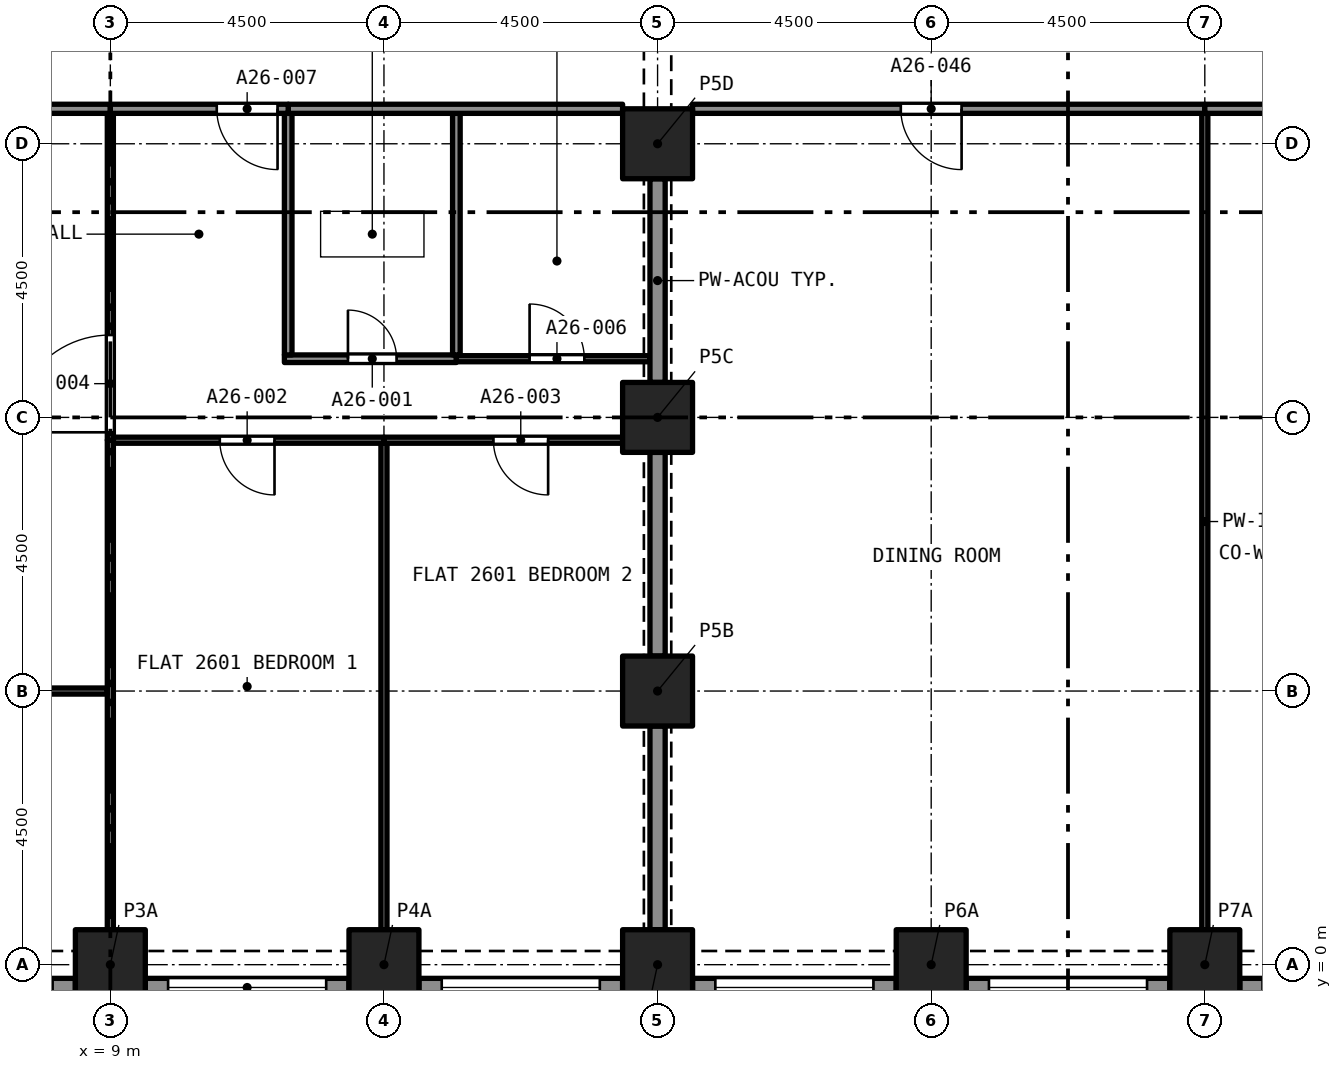
"""IFC4 building model, lengths in metres.
Left out: names, types, materials, properties, quantities, classifications, styles, units other than length and angle.
Written with IfcOpenShell. Run it as: python <this file> out.ifc"""

import sys

from ifc_helpers import new_model, si_unit, direction, frame, frame_2d, origin, origin_2d, place, context, subcontext, project, spatial, rectangle, extrude, element, fill, save


model = new_model("IFC4")
c1 = context("Model", 3, precision=1e-05, world=origin(), true_north=direction((0.0, 1.0)))
c2 = subcontext(c1, "Body", "Model", "MODEL_VIEW")
j1 = project(units=[si_unit("LENGTHUNIT", "METRE"), si_unit("PLANEANGLEUNIT", "RADIAN")], contexts=[c1])
p1 = place(None, origin())
s1 = spatial("IfcSite", under=j1, at=p1, CompositionType="ELEMENT")
p2 = place(p1, origin())
s2 = spatial("IfcBuilding", under=s1, at=p2, CompositionType="ELEMENT")
p3 = place(p2, frame((0.0, 0.0, 96.0)))
s3 = spatial("IfcBuildingStorey", under=s2, at=p3, CompositionType="ELEMENT", Elevation=96.0)
for number, where, z_axis, x_axis in (
    (1, (9.0, 0.0, 0.0), (0.0, 0.0, 1.0), (1.0, 0.0, 0.0)),
    (2, (13.5, 0.0, 0.0), (0.0, 0.0, 1.0), (1.0, 0.0, 0.0)),
    (3, (18.0, 0.0, 0.0), (0.0, 0.0, 1.0), (1.0, 0.0, 0.0)),
    (4, (22.5, 0.0, 0.0), (0.0, 0.0, 1.0), (1.0, 0.0, 0.0)),
    (5, (27.0, 0.0, 0.0), (0.0, 0.0, 1.0), (1.0, 0.0, 0.0)),
    (6, (18.0, 4.5, 0.0), (0.0, 0.0, 1.0), (1.0, 0.0, 0.0)),
    (7, (18.0, 9.0, 0.0), (0.0, 0.0, 1.0), (1.0, 0.0, 0.0)),
    (8, (18.0, 13.5, 0.0), (0.0, 0.0, 1.0), (1.0, 0.0, 0.0)),
):
    element("IfcColumn", number, at=place(p3, frame(where, z_axis=z_axis, x_axis=x_axis)), inside=s3, PredefinedType="COLUMN", context=c2, shape_type="SweptSolid", body=[
        extrude(rectangle(XDim=1.15, YDim=1.15, at=origin_2d()), origin(), (0.0, 0.0, 1.0), 3.2),
    ])
p4 = place(p3, frame((8.425, -0.375, 0.0), z_axis=(0.0, 0.0, 1.0), x_axis=(-1.0, 0.0, 0.0)))
e9 = element("IfcWall", 9, at=p4, inside=s3, PredefinedType="SOLIDWALL", context=c2, shape_type="SweptSolid", body=[
    extrude(rectangle(XDim=3.35, YDim=0.3, at=frame_2d((1.675, 0.0))), origin(), (0.0, 0.0, 1.0), 3.2),
])
p5 = place(p4, frame((0.375, 0.0, 0.45)))
e10 = element("IfcOpeningElement", 10, at=p5, cuts=e9, PredefinedType="OPENING", context=c2, shape_type="SweptSolid", body=[
    extrude(rectangle(XDim=2.6, YDim=1.95, at=frame_2d((1.3, 0.975))), frame((0.0, 0.16, 0.0), z_axis=(0.0, -1.0, 0.0), x_axis=(1.0, 0.0, 0.0)), (0.0, 0.0, 1.0), 0.32),
])
p6 = place(p3, frame((12.925, -0.375, 0.0), z_axis=(0.0, 0.0, 1.0), x_axis=(-1.0, 0.0, 0.0)))
e11 = element("IfcWall", 11, at=p6, inside=s3, PredefinedType="SOLIDWALL", context=c2, shape_type="SweptSolid", body=[
    extrude(rectangle(XDim=3.35, YDim=0.3, at=frame_2d((1.675, 0.0))), origin(), (0.0, 0.0, 1.0), 3.2),
])
p7 = place(p6, frame((0.375, 0.0, 0.45)))
e12 = element("IfcOpeningElement", 12, at=p7, cuts=e11, PredefinedType="OPENING", context=c2, shape_type="SweptSolid", body=[
    extrude(rectangle(XDim=2.6, YDim=1.95, at=frame_2d((1.3, 0.975))), frame((0.0, 0.16, 0.0), z_axis=(0.0, -1.0, 0.0), x_axis=(1.0, 0.0, 0.0)), (0.0, 0.0, 1.0), 0.32),
])
p8 = place(p3, frame((17.425, -0.375, 0.0), z_axis=(0.0, 0.0, 1.0), x_axis=(-1.0, 0.0, 0.0)))
e13 = element("IfcWall", 13, at=p8, inside=s3, PredefinedType="SOLIDWALL", context=c2, shape_type="SweptSolid", body=[
    extrude(rectangle(XDim=3.35, YDim=0.3, at=frame_2d((1.675, 0.0))), origin(), (0.0, 0.0, 1.0), 3.2),
])
p9 = place(p8, frame((0.375, 0.0, 0.45)))
e14 = element("IfcOpeningElement", 14, at=p9, cuts=e13, PredefinedType="OPENING", context=c2, shape_type="SweptSolid", body=[
    extrude(rectangle(XDim=2.6, YDim=1.95, at=frame_2d((1.3, 0.975))), frame((0.0, 0.16, 0.0), z_axis=(0.0, -1.0, 0.0), x_axis=(1.0, 0.0, 0.0)), (0.0, 0.0, 1.0), 0.32),
])
p10 = place(p3, frame((21.925, -0.375, 0.0), z_axis=(0.0, 0.0, 1.0), x_axis=(-1.0, 0.0, 0.0)))
e15 = element("IfcWall", 15, at=p10, inside=s3, PredefinedType="SOLIDWALL", context=c2, shape_type="SweptSolid", body=[
    extrude(rectangle(XDim=3.35, YDim=0.3, at=frame_2d((1.675, 0.0))), origin(), (0.0, 0.0, 1.0), 3.2),
])
p11 = place(p10, frame((0.375, 0.0, 0.45)))
e16 = element("IfcOpeningElement", 16, at=p11, cuts=e15, PredefinedType="OPENING", context=c2, shape_type="SweptSolid", body=[
    extrude(rectangle(XDim=2.6, YDim=1.95, at=frame_2d((1.3, 0.975))), frame((0.0, 0.16, 0.0), z_axis=(0.0, -1.0, 0.0), x_axis=(1.0, 0.0, 0.0)), (0.0, 0.0, 1.0), 0.32),
])
p12 = place(p3, frame((26.425, -0.375, 0.0), z_axis=(0.0, 0.0, 1.0), x_axis=(-1.0, 0.0, 0.0)))
e17 = element("IfcWall", 17, at=p12, inside=s3, PredefinedType="SOLIDWALL", context=c2, shape_type="SweptSolid", body=[
    extrude(rectangle(XDim=3.35, YDim=0.3, at=frame_2d((1.675, 0.0))), origin(), (0.0, 0.0, 1.0), 3.2),
])
p13 = place(p12, frame((0.375, 0.0, 0.45)))
e18 = element("IfcOpeningElement", 18, at=p13, cuts=e17, PredefinedType="OPENING", context=c2, shape_type="SweptSolid", body=[
    extrude(rectangle(XDim=2.6, YDim=1.95, at=frame_2d((1.3, 0.975))), frame((0.0, 0.16, 0.0), z_axis=(0.0, -1.0, 0.0), x_axis=(1.0, 0.0, 0.0)), (0.0, 0.0, 1.0), 0.32),
])
p14 = place(p3, frame((30.925, -0.375, 0.0), z_axis=(0.0, 0.0, 1.0), x_axis=(-1.0, 0.0, 0.0)))
e19 = element("IfcWall", 19, at=p14, inside=s3, PredefinedType="SOLIDWALL", context=c2, shape_type="SweptSolid", body=[
    extrude(rectangle(XDim=3.35, YDim=0.3, at=frame_2d((1.675, 0.0))), origin(), (0.0, 0.0, 1.0), 3.2),
])
p15 = place(p14, frame((0.375, 0.0, 0.45)))
e20 = element("IfcOpeningElement", 20, at=p15, cuts=e19, PredefinedType="OPENING", context=c2, shape_type="SweptSolid", body=[
    extrude(rectangle(XDim=2.6, YDim=1.95, at=frame_2d((1.3, 0.975))), frame((0.0, 0.16, 0.0), z_axis=(0.0, -1.0, 0.0), x_axis=(1.0, 0.0, 0.0)), (0.0, 0.0, 1.0), 0.32),
])
p16 = place(p3, frame((11.863, 9.965, 0.0), z_axis=(0.0, 0.0, 1.0), x_axis=(1.0, 0.0, 0.0)))
e21 = element("IfcWall", 21, at=p16, inside=s3, PredefinedType="PARTITIONING", context=c2, shape_type="SweptSolid", body=[
    extrude(rectangle(XDim=2.828, YDim=0.125, at=frame_2d((1.414, 0.0))), origin(), (0.0, 0.0, 1.0), 2.9),
])
p17 = place(p16, frame((1.045, 0.0, 0.0)))
e22 = element("IfcOpeningElement", 22, at=p17, cuts=e21, PredefinedType="OPENING", context=c2, shape_type="SweptSolid", body=[
    extrude(rectangle(XDim=0.8, YDim=2.1, at=frame_2d((0.4, 1.05))), frame((0.0, 0.073, 0.0), z_axis=(0.0, -1.0, 0.0), x_axis=(1.0, 0.0, 0.0)), (0.0, 0.0, 1.0), 0.145),
])
for number, where, z_axis, x_axis in (
    (23, (11.925, 10.028, 0.0), (0.0, 0.0, 1.0), (0.0, 1.0, 0.0)),
    (24, (14.691, 10.028, 0.0), (0.0, 0.0, 1.0), (0.0, 1.0, 0.0)),
):
    element("IfcWall", number, at=place(p3, frame(where, z_axis=z_axis, x_axis=x_axis)), inside=s3, PredefinedType="PARTITIONING", context=c2, shape_type="SweptSolid", body=[
        extrude(rectangle(XDim=3.972, YDim=0.125, at=frame_2d((1.986, 0.0))), origin(), (0.0, 0.0, 1.0), 2.9),
    ])
p18 = place(p3, frame((11.925, 14.075, 0.0), z_axis=(0.0, 0.0, 1.0), x_axis=(1.0, 0.0, 0.0)))
e25 = element("IfcWall", 25, at=p18, inside=s3, PredefinedType="PARTITIONING", context=c2, shape_type="SweptSolid", body=[
    extrude(rectangle(XDim=5.5, YDim=0.15, at=frame_2d((2.75, 0.0))), origin(), (0.0, 0.0, 1.0), 2.9),
])
p19 = place(p3, frame((13.5, 0.575, 0.0), z_axis=(0.0, 0.0, 1.0), x_axis=(0.0, 1.0, 0.0)))
e26 = element("IfcWall", 26, at=p19, inside=s3, PredefinedType="PARTITIONING", context=c2, shape_type="SweptSolid", body=[
    extrude(rectangle(XDim=8.0, YDim=0.1, at=frame_2d((4.0, 0.0))), origin(), (0.0, 0.0, 1.0), 2.9),
])
p20 = place(p3, frame((13.5, 8.625, 0.0), z_axis=(0.0, 0.0, 1.0), x_axis=(-1.0, 0.0, 0.0)))
e27 = element("IfcWall", 27, at=p20, inside=s3, PredefinedType="PARTITIONING", context=c2, shape_type="SweptSolid", body=[
    extrude(rectangle(XDim=4.45, YDim=0.1, at=frame_2d((2.225, 0.0))), origin(), (0.0, 0.0, 1.0), 2.9),
])
p21 = place(p20, frame((1.8, 0.0, 0.0)))
e28 = element("IfcOpeningElement", 28, at=p21, cuts=e27, PredefinedType="OPENING", context=c2, shape_type="SweptSolid", body=[
    extrude(rectangle(XDim=0.9, YDim=2.1, at=frame_2d((0.45, 1.05))), frame((0.0, 0.06, 0.0), z_axis=(0.0, -1.0, 0.0), x_axis=(1.0, 0.0, 0.0)), (0.0, 0.0, 1.0), 0.12),
])
p22 = place(p3, frame((9.0, 0.575, 0.0), z_axis=(0.0, 0.0, 1.0), x_axis=(0.0, 1.0, 0.0)))
e29 = element("IfcWall", 29, at=p22, inside=s3, PredefinedType="PARTITIONING", context=c2, shape_type="SweptSolid", body=[
    extrude(rectangle(XDim=8.05, YDim=0.1, at=frame_2d((4.025, 0.0))), origin(), (0.0, 0.0, 1.0), 2.9),
])
p23 = place(p3, frame((17.425, 8.625, 0.0), z_axis=(0.0, 0.0, 1.0), x_axis=(-1.0, 0.0, 0.0)))
e30 = element("IfcWall", 30, at=p23, inside=s3, PredefinedType="PARTITIONING", context=c2, shape_type="SweptSolid", body=[
    extrude(rectangle(XDim=3.925, YDim=0.1, at=frame_2d((1.962, 0.0))), origin(), (0.0, 0.0, 1.0), 2.9),
])
p24 = place(p23, frame((1.225, 0.0, 0.0)))
e31 = element("IfcOpeningElement", 31, at=p24, cuts=e30, PredefinedType="OPENING", context=c2, shape_type="SweptSolid", body=[
    extrude(rectangle(XDim=0.9, YDim=2.1, at=frame_2d((0.45, 1.05))), frame((0.0, 0.06, 0.0), z_axis=(0.0, -1.0, 0.0), x_axis=(1.0, 0.0, 0.0)), (0.0, 0.0, 1.0), 0.12),
])
for number, where, z_axis, x_axis in (
    (32, (18.0, 5.075, 0.0), (0.0, 0.0, 1.0), (0.0, 1.0, 0.0)),
    (33, (18.0, 0.575, 0.0), (0.0, 0.0, 1.0), (0.0, 1.0, 0.0)),
):
    element("IfcWall", number, at=place(p3, frame(where, z_axis=z_axis, x_axis=x_axis)), inside=s3, PredefinedType="PARTITIONING", context=c2, shape_type="SweptSolid", body=[
        extrude(rectangle(XDim=3.35, YDim=0.25, at=frame_2d((1.675, 0.0))), origin(), (0.0, 0.0, 1.0), 2.38),
    ])
p25 = place(p3, frame((9.0, 8.625, 0.0), z_axis=(0.0, 0.0, 1.0), x_axis=(0.0, 1.0, 0.0)))
e34 = element("IfcWall", 34, at=p25, inside=s3, PredefinedType="PARTITIONING", context=c2, shape_type="SweptSolid", body=[
    extrude(rectangle(XDim=5.375, YDim=0.1, at=frame_2d((2.688, 0.0))), origin(), (0.0, 0.0, 1.0), 2.9),
])
p26 = place(p25, frame((0.13, 0.0, 0.0)))
e35 = element("IfcOpeningElement", 35, at=p26, cuts=e34, PredefinedType="OPENING", context=c2, shape_type="SweptSolid", body=[
    extrude(rectangle(XDim=1.6, YDim=2.1, at=frame_2d((0.8, 1.05))), frame((0.0, 0.06, 0.0), z_axis=(0.0, -1.0, 0.0), x_axis=(1.0, 0.0, 0.0)), (0.0, 0.0, 1.0), 0.12),
])
p27 = place(p3, frame((0.622, 4.5, 0.0), z_axis=(0.0, 0.0, 1.0), x_axis=(1.0, 0.0, 0.0)))
e36 = element("IfcWall", 36, at=p27, inside=s3, PredefinedType="PARTITIONING", context=c2, shape_type="SweptSolid", body=[
    extrude(rectangle(XDim=8.328, YDim=0.1, at=frame_2d((4.164, 0.0))), origin(), (0.0, 0.0, 1.0), 2.9),
])
p28 = place(p27, frame((3.365, 0.0, 0.0)))
e37 = element("IfcOpeningElement", 37, at=p28, cuts=e36, PredefinedType="OPENING", context=c2, shape_type="SweptSolid", body=[
    extrude(rectangle(XDim=1.6, YDim=2.1, at=frame_2d((0.8, 1.05))), frame((0.0, 0.06, 0.0), z_axis=(0.0, -1.0, 0.0), x_axis=(1.0, 0.0, 0.0)), (0.0, 0.0, 1.0), 0.12),
])
p29 = place(p3, frame((0.575, 14.075, 0.0), z_axis=(0.0, 0.0, 1.0), x_axis=(1.0, 0.0, 0.0)))
e38 = element("IfcWall", 38, at=p29, inside=s3, PredefinedType="PARTITIONING", context=c2, shape_type="SweptSolid", body=[
    extrude(rectangle(XDim=8.425, YDim=0.15, at=frame_2d((4.212, 0.0))), origin(), (0.0, 0.0, 1.0), 2.9),
])
p30 = place(p3, frame((14.69, 9.965, 0.0), z_axis=(0.0, 0.0, 1.0), x_axis=(1.0, 0.0, 0.0)))
e39 = element("IfcWall", 39, at=p30, inside=s3, PredefinedType="PARTITIONING", context=c2, shape_type="SweptSolid", body=[
    extrude(rectangle(XDim=3.185, YDim=0.1, at=frame_2d((1.592, 0.0))), origin(), (0.0, 0.0, 1.0), 2.9),
])
p31 = place(p30, frame((1.205, 0.0, 0.0)))
e40 = element("IfcOpeningElement", 40, at=p31, cuts=e39, PredefinedType="OPENING", context=c2, shape_type="SweptSolid", body=[
    extrude(rectangle(XDim=0.9, YDim=2.1, at=frame_2d((0.45, 1.05))), frame((0.0, 0.06, 0.0), z_axis=(0.0, -1.0, 0.0), x_axis=(1.0, 0.0, 0.0)), (0.0, 0.0, 1.0), 0.12),
])
p32 = place(p3, frame((18.0, 9.575, 0.0), z_axis=(0.0, 0.0, 1.0), x_axis=(0.0, 1.0, 0.0)))
e41 = element("IfcWall", 41, at=p32, inside=s3, PredefinedType="PARTITIONING", context=c2, shape_type="SweptSolid", body=[
    extrude(rectangle(XDim=3.35, YDim=0.25, at=frame_2d((1.675, 0.0))), origin(), (0.0, 0.0, 1.0), 2.38),
])
p33 = place(p3, frame((11.925, 14.075, 0.0), z_axis=(0.0, 0.0, 1.0), x_axis=(-1.0, 0.0, 0.0)))
e42 = element("IfcWall", 42, at=p33, inside=s3, PredefinedType="PARTITIONING", context=c2, shape_type="SweptSolid", body=[
    extrude(rectangle(XDim=2.925, YDim=0.15, at=frame_2d((1.462, 0.0))), origin(), (0.0, 0.0, 1.0), 2.9),
])
p34 = place(p33, frame((0.175, 0.0, 0.0)))
e43 = element("IfcOpeningElement", 43, at=p34, cuts=e42, PredefinedType="OPENING", context=c2, shape_type="SweptSolid", body=[
    extrude(rectangle(XDim=1.0, YDim=2.1, at=frame_2d((0.5, 1.05))), frame((0.0, 0.085, 0.0), z_axis=(0.0, -1.0, 0.0), x_axis=(1.0, 0.0, 0.0)), (0.0, 0.0, 1.0), 0.17),
])
p35 = place(p3, frame((27.0, 0.575, 0.0), z_axis=(0.0, 0.0, 1.0), x_axis=(0.0, 1.0, 0.0)))
e44 = element("IfcWall", 44, at=p35, inside=s3, PredefinedType="PARTITIONING", context=c2, shape_type="SweptSolid", body=[
    extrude(rectangle(XDim=13.425, YDim=0.1, at=frame_2d((6.712, 0.0))), origin(), (0.0, 0.0, 1.0), 2.75),
])
p36 = place(p3, frame((27.0, 14.075, 0.0), z_axis=(0.0, 0.0, 1.0), x_axis=(-1.0, 0.0, 0.0)))
e45 = element("IfcWall", 45, at=p36, inside=s3, PredefinedType="PARTITIONING", context=c2, shape_type="SweptSolid", body=[
    extrude(rectangle(XDim=8.425, YDim=0.15, at=frame_2d((4.212, 0.0))), origin(), (0.0, 0.0, 1.0), 2.75),
])
p37 = place(p36, frame((4.0, 0.0, 0.0)))
e46 = element("IfcOpeningElement", 46, at=p37, cuts=e45, PredefinedType="OPENING", context=c2, shape_type="SweptSolid", body=[
    extrude(rectangle(XDim=1.0, YDim=2.1, at=frame_2d((0.5, 1.05))), frame((0.0, 0.085, 0.0), z_axis=(0.0, -1.0, 0.0), x_axis=(1.0, 0.0, 0.0)), (0.0, 0.0, 1.0), 0.17),
])
p38 = place(p3, frame((30.925, 14.075, 0.0), z_axis=(0.0, 0.0, 1.0), x_axis=(-1.0, 0.0, 0.0)))
e47 = element("IfcWall", 47, at=p38, inside=s3, PredefinedType="PARTITIONING", context=c2, shape_type="SweptSolid", body=[
    extrude(rectangle(XDim=3.925, YDim=0.15, at=frame_2d((1.962, 0.0))), origin(), (0.0, 0.0, 1.0), 2.75),
])
p39 = place(p38, frame((1.175, 0.0, 0.0)))
e48 = element("IfcOpeningElement", 48, at=p39, cuts=e47, PredefinedType="OPENING", context=c2, shape_type="SweptSolid", body=[
    extrude(rectangle(XDim=1.0, YDim=2.1, at=frame_2d((0.5, 1.05))), frame((0.0, 0.085, 0.0), z_axis=(0.0, -1.0, 0.0), x_axis=(1.0, 0.0, 0.0)), (0.0, 0.0, 1.0), 0.17),
])
p40 = place(p7, origin())
e49 = element("IfcWindow", 49, at=p40, inside=s3, PartitioningType="SINGLE_PANEL", PredefinedType="WINDOW", context=c2, shape_type="SweptSolid", body=[
    extrude(rectangle(XDim=2.6, YDim=1.95, at=frame_2d((1.3, 0.975))), frame((0.0, 0.03, 0.0), z_axis=(0.0, -1.0, 0.0), x_axis=(1.0, 0.0, 0.0)), (0.0, 0.0, 1.0), 0.06),
])
fill(e12, e49)
p41 = place(p9, origin())
e50 = element("IfcWindow", 50, at=p41, inside=s3, PartitioningType="SINGLE_PANEL", PredefinedType="WINDOW", context=c2, shape_type="SweptSolid", body=[
    extrude(rectangle(XDim=2.6, YDim=1.95, at=frame_2d((1.3, 0.975))), frame((0.0, 0.03, 0.0), z_axis=(0.0, -1.0, 0.0), x_axis=(1.0, 0.0, 0.0)), (0.0, 0.0, 1.0), 0.06),
])
fill(e14, e50)
p42 = place(p11, origin())
e51 = element("IfcWindow", 51, at=p42, inside=s3, PartitioningType="SINGLE_PANEL", PredefinedType="WINDOW", context=c2, shape_type="SweptSolid", body=[
    extrude(rectangle(XDim=2.6, YDim=1.95, at=frame_2d((1.3, 0.975))), frame((0.0, 0.03, 0.0), z_axis=(0.0, -1.0, 0.0), x_axis=(1.0, 0.0, 0.0)), (0.0, 0.0, 1.0), 0.06),
])
fill(e16, e51)
p43 = place(p13, origin())
e52 = element("IfcWindow", 52, at=p43, inside=s3, PartitioningType="SINGLE_PANEL", PredefinedType="WINDOW", context=c2, shape_type="SweptSolid", body=[
    extrude(rectangle(XDim=2.6, YDim=1.95, at=frame_2d((1.3, 0.975))), frame((0.0, 0.03, 0.0), z_axis=(0.0, -1.0, 0.0), x_axis=(1.0, 0.0, 0.0)), (0.0, 0.0, 1.0), 0.06),
])
fill(e18, e52)
p44 = place(p17, origin())
e53 = element("IfcDoor", 53, at=p44, inside=s3, OperationType="SINGLE_SWING_RIGHT", PredefinedType="DOOR", context=c2, shape_type="SweptSolid", body=[
    extrude(rectangle(XDim=0.8, YDim=2.1, at=frame_2d((0.4, 1.05))), frame((0.0, 0.025, 0.0), z_axis=(0.0, -1.0, 0.0), x_axis=(1.0, 0.0, 0.0)), (0.0, 0.0, 1.0), 0.05),
])
fill(e22, e53)
p45 = place(p21, origin())
e54 = element("IfcDoor", 54, at=p45, inside=s3, OperationType="SINGLE_SWING_RIGHT", PredefinedType="DOOR", context=c2, shape_type="SweptSolid", body=[
    extrude(rectangle(XDim=0.9, YDim=2.1, at=frame_2d((0.45, 1.05))), frame((0.0, 0.025, 0.0), z_axis=(0.0, -1.0, 0.0), x_axis=(1.0, 0.0, 0.0)), (0.0, 0.0, 1.0), 0.05),
])
fill(e28, e54)
p46 = place(p24, origin())
e55 = element("IfcDoor", 55, at=p46, inside=s3, OperationType="SINGLE_SWING_LEFT", PredefinedType="DOOR", context=c2, shape_type="SweptSolid", body=[
    extrude(rectangle(XDim=0.9, YDim=2.1, at=frame_2d((0.45, 1.05))), frame((0.0, 0.025, 0.0), z_axis=(0.0, -1.0, 0.0), x_axis=(1.0, 0.0, 0.0)), (0.0, 0.0, 1.0), 0.05),
])
fill(e31, e55)
p47 = place(p26, origin())
e56 = element("IfcDoor", 56, at=p47, inside=s3, OperationType="SINGLE_SWING_LEFT", PredefinedType="DOOR", context=c2, shape_type="SweptSolid", body=[
    extrude(rectangle(XDim=1.6, YDim=2.1, at=frame_2d((0.8, 1.05))), frame((0.0, 0.025, 0.0), z_axis=(0.0, -1.0, 0.0), x_axis=(1.0, 0.0, 0.0)), (0.0, 0.0, 1.0), 0.05),
])
fill(e35, e56)
p48 = place(p31, origin())
e57 = element("IfcDoor", 57, at=p48, inside=s3, OperationType="SINGLE_SWING_RIGHT", PredefinedType="DOOR", context=c2, shape_type="SweptSolid", body=[
    extrude(rectangle(XDim=0.9, YDim=2.1, at=frame_2d((0.45, 1.05))), frame((0.0, 0.025, 0.0), z_axis=(0.0, -1.0, 0.0), x_axis=(1.0, 0.0, 0.0)), (0.0, 0.0, 1.0), 0.05),
])
fill(e40, e57)
p49 = place(p34, origin())
e58 = element("IfcDoor", 58, at=p49, inside=s3, OperationType="SINGLE_SWING_LEFT", PredefinedType="DOOR", context=c2, shape_type="SweptSolid", body=[
    extrude(rectangle(XDim=1.0, YDim=2.1, at=frame_2d((0.5, 1.05))), frame((0.0, 0.025, 0.0), z_axis=(0.0, -1.0, 0.0), x_axis=(1.0, 0.0, 0.0)), (0.0, 0.0, 1.0), 0.05),
])
fill(e43, e58)
p50 = place(p37, origin())
e59 = element("IfcDoor", 59, at=p50, inside=s3, OperationType="SINGLE_SWING_RIGHT", PredefinedType="DOOR", context=c2, shape_type="SweptSolid", body=[
    extrude(rectangle(XDim=1.0, YDim=2.1, at=frame_2d((0.5, 1.05))), frame((0.0, 0.025, 0.0), z_axis=(0.0, -1.0, 0.0), x_axis=(1.0, 0.0, 0.0)), (0.0, 0.0, 1.0), 0.05),
])
fill(e46, e59)
save(model, sys.argv[1])
